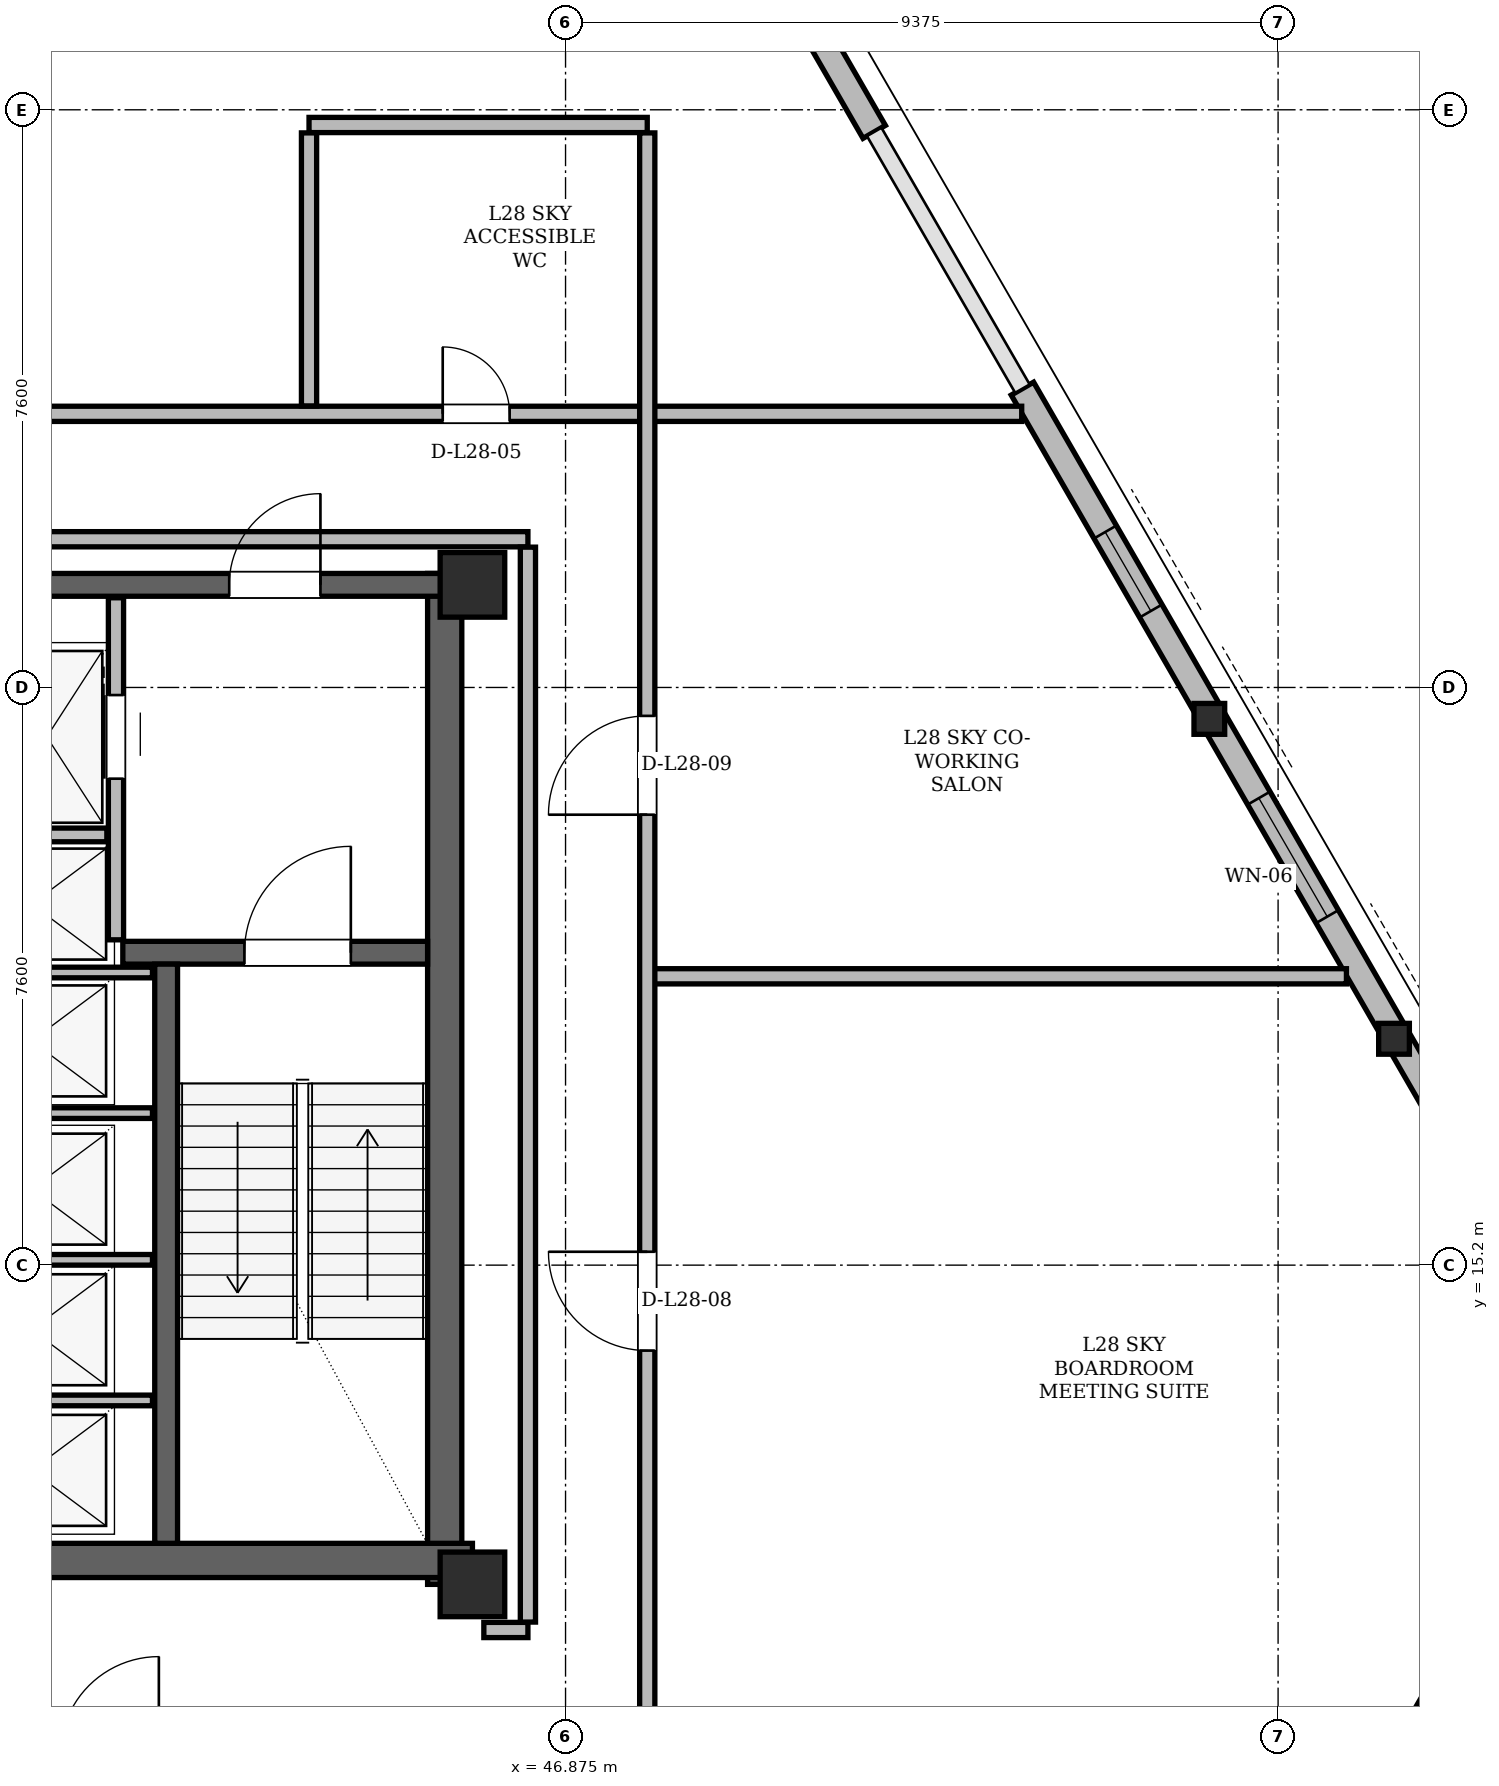
"""IFC4 building model, lengths in metres.
Left out: names, types, materials, properties, quantities, classifications, styles, units other than length and angle.
Written with IfcOpenShell. Run it as: python <this file> out.ifc"""

import sys

from ifc_helpers import new_model, si_unit, direction, frame, frame_2d, origin, origin_2d, place, context, subcontext, project, spatial, rectangle, hollow_rectangle, i_section, extrude, element, fill, save


model = new_model("IFC4")
c1 = context("Model", 3, precision=1e-05, world=origin(), true_north=direction((0.0, 1.0)))
c2 = subcontext(c1, "Body", "Model", "MODEL_VIEW")
j1 = project(units=[si_unit("LENGTHUNIT", "METRE"), si_unit("PLANEANGLEUNIT", "RADIAN")], contexts=[c1])
p1 = place(None, origin())
s1 = spatial("IfcSite", under=j1, at=p1, CompositionType="ELEMENT")
p2 = place(p1, origin())
s2 = spatial("IfcBuilding", under=s1, at=p2, CompositionType="ELEMENT")
p3 = place(p2, frame((0.0, 0.0, 107.7)))
s3 = spatial("IfcBuildingStorey", under=s2, at=p3, CompositionType="ELEMENT", Elevation=107.7)
for number, where, z_axis, x_axis in (
    (1, (45.65, 11.0, 0.0), (0.0, 0.0, 1.0), (1.0, 0.0, 0.0)),
    (2, (45.65, 24.15, 0.0), (0.0, 0.0, 1.0), (1.0, 0.0, 0.0)),
):
    element("IfcColumn", number, at=place(p3, frame(where, z_axis=z_axis, x_axis=x_axis)), inside=s3, PredefinedType="COLUMN", context=c2, shape_type="SweptSolid", body=[
        extrude(hollow_rectangle(XDim=0.85, YDim=0.85, WallThickness=0.07, at=origin_2d()), origin(), (0.0, 0.0, 1.0), 4.5),
    ])
p4 = place(p3, frame((57.806, 18.211, 0.005), z_axis=(-0.013533621776, -0.014511955881, 0.999803102725), x_axis=(0.731328464802, -0.682025422231, 0.0)))
e3 = element("IfcColumn", 3, at=p4, inside=s3, PredefinedType="COLUMN", context=c2, shape_type="SweptSolid", body=[
    extrude(i_section(OverallWidth=0.404, OverallDepth=0.406, WebThickness=0.027, FlangeThickness=0.044, at=origin_2d()), origin(), (0.0, 0.0, 1.0), 4.492),
])
p5 = place(p3, frame((55.378, 22.415, 0.005), z_axis=(-0.014729514646, -0.012501064091, 0.999813364981), x_axis=(0.647076579323, -0.762425013029, 0.0)))
e4 = element("IfcColumn", 4, at=p5, inside=s3, PredefinedType="COLUMN", context=c2, shape_type="SweptSolid", body=[
    extrude(i_section(OverallWidth=0.404, OverallDepth=0.406, WebThickness=0.027, FlangeThickness=0.044, at=origin_2d()), origin(), (0.0, 0.0, 1.0), 4.492),
])
p6 = place(p3, frame((45.285, 11.0, 0.0), z_axis=(0.0, 0.0, 1.0), x_axis=(0.0, 1.0, 0.0)))
e5 = element("IfcWall", 5, at=p6, inside=s3, PredefinedType="SHEAR", context=c2, shape_type="SweptSolid", body=[
    extrude(rectangle(XDim=13.3, YDim=0.45, at=frame_2d((6.65, 0.0))), origin(), (0.0, 0.0, 1.0), 4.26),
])
p7 = place(p3, frame((38.55, 11.315, 0.0), z_axis=(0.0, 0.0, 1.0), x_axis=(1.0, 0.0, 0.0)))
e6 = element("IfcWall", 6, at=p7, inside=s3, PredefinedType="SHEAR", context=c2, shape_type="SweptSolid", body=[
    extrude(rectangle(XDim=7.1, YDim=0.45, at=frame_2d((3.55, 0.0))), origin(), (0.0, 0.0, 1.0), 4.26),
])
p8 = place(p3, frame((29.65, 24.15, 0.0), z_axis=(0.0, 0.0, 1.0), x_axis=(1.0, 0.0, 0.0)))
e7 = element("IfcWall", 7, at=p8, inside=s3, PredefinedType="SHEAR", context=c2, shape_type="SweptSolid", body=[
    extrude(rectangle(XDim=15.7, YDim=0.3, at=frame_2d((7.85, 0.0))), origin(), (0.0, 0.0, 1.0), 4.26),
])
p9 = place(p8, frame((1.7, 0.0, 0.0)))
e8 = element("IfcOpeningElement", 8, at=p9, cuts=e7, PredefinedType="OPENING", context=c2, shape_type="SweptSolid", body=[
    extrude(rectangle(XDim=1.2, YDim=2.2, at=frame_2d((0.6, 1.1))), frame((0.0, 0.15, 0.0), z_axis=(0.0, -1.0, 0.0), x_axis=(1.0, 0.0, 0.0)), (0.0, 0.0, 1.0), 0.3),
])
p10 = place(p8, frame((12.8, 0.0, 0.0)))
e9 = element("IfcOpeningElement", 9, at=p10, cuts=e7, PredefinedType="OPENING", context=c2, shape_type="SweptSolid", body=[
    extrude(rectangle(XDim=1.2, YDim=2.2, at=frame_2d((0.6, 1.1))), frame((0.0, 0.15, 0.0), z_axis=(0.0, -1.0, 0.0), x_axis=(1.0, 0.0, 0.0)), (0.0, 0.0, 1.0), 0.3),
])
p11 = place(p8, frame((6.55, 0.0, 0.0)))
e10 = element("IfcOpeningElement", 10, at=p11, cuts=e7, PredefinedType="OPENING", context=c2, shape_type="SweptSolid", body=[
    extrude(rectangle(XDim=0.9, YDim=2.05, at=frame_2d((0.45, 1.025))), frame((0.0, 0.15, 0.0), z_axis=(0.0, -1.0, 0.0), x_axis=(1.0, 0.0, 0.0)), (0.0, 0.0, 1.0), 0.3),
])
p12 = place(p8, frame((8.45, 0.0, 0.0)))
e11 = element("IfcOpeningElement", 11, at=p12, cuts=e7, PredefinedType="OPENING", context=c2, shape_type="SweptSolid", body=[
    extrude(rectangle(XDim=0.9, YDim=2.05, at=frame_2d((0.45, 1.025))), frame((0.0, 0.15, 0.0), z_axis=(0.0, -1.0, 0.0), x_axis=(1.0, 0.0, 0.0)), (0.0, 0.0, 1.0), 0.3),
])
p13 = place(p3, frame((41.05, 19.31, 0.0), z_axis=(0.0, 0.0, 1.0), x_axis=(1.0, 0.0, 0.0)))
e12 = element("IfcWall", 12, at=p13, inside=s3, PredefinedType="SHEAR", context=c2, shape_type="SweptSolid", body=[
    extrude(rectangle(XDim=4.01, YDim=0.3, at=frame_2d((2.005, 0.0))), origin(), (0.0, 0.0, 1.0), 4.26),
])
p14 = place(p13, frame((1.6, 0.0, 0.0)))
e13 = element("IfcOpeningElement", 13, at=p14, cuts=e12, PredefinedType="OPENING", context=c2, shape_type="SweptSolid", body=[
    extrude(rectangle(XDim=1.4, YDim=2.2, at=frame_2d((0.7, 1.1))), frame((0.0, 0.15, 0.0), z_axis=(0.0, -1.0, 0.0), x_axis=(1.0, 0.0, 0.0)), (0.0, 0.0, 1.0), 0.3),
])
p15 = place(p3, frame((41.62, 11.54, 0.0), z_axis=(0.0, 0.0, 1.0), x_axis=(0.0, 1.0, 0.0)))
e14 = element("IfcWall", 14, at=p15, inside=s3, PredefinedType="SHEAR", context=c2, shape_type="SweptSolid", body=[
    extrude(rectangle(XDim=7.62, YDim=0.3, at=frame_2d((3.81, 0.0))), origin(), (0.0, 0.0, 1.0), 4.26),
])
p16 = place(p3, frame((54.837, 3.459, 0.0), z_axis=(0.0, 0.0, 1.0), x_axis=(0.500009490851, 0.86601992417, 0.0)))
e15 = element("IfcWall", 15, at=p16, inside=s3, PredefinedType="SOLIDWALL", context=c2, shape_type="SweptSolid", body=[
    extrude(rectangle(XDim=11.486, YDim=0.34, at=frame_2d((5.743, 0.0))), origin(), (0.0, 0.0, 1.0), 3.478),
])
p17 = place(p3, frame((60.58, 13.406, 0.0), z_axis=(0.0, 0.0, 1.0), x_axis=(-0.499995774941, 0.86602784311, 0.0)))
e16 = element("IfcWall", 16, at=p17, inside=s3, PredefinedType="SOLIDWALL", context=c2, shape_type="SweptSolid", body=[
    extrude(rectangle(XDim=15.387, YDim=0.34, at=frame_2d((7.693, 0.0))), origin(), (0.0, 0.0, 1.0), 3.478),
])
p18 = place(p17, frame((1.263, 0.0, 0.85)))
e17 = element("IfcOpeningElement", 17, at=p18, cuts=e16, PredefinedType="OPENING", context=c2, shape_type="SweptSolid", body=[
    extrude(rectangle(XDim=2.0, YDim=1.8, at=frame_2d((1.0, 0.9))), frame((0.0, 0.17, 0.0), z_axis=(0.0, -1.0, 0.0), x_axis=(1.0, 0.0, 0.0)), (0.0, 0.0, 1.0), 0.34),
])
p19 = place(p17, frame((7.365, 0.0, 0.85)))
e18 = element("IfcOpeningElement", 18, at=p19, cuts=e16, PredefinedType="OPENING", context=c2, shape_type="SweptSolid", body=[
    extrude(rectangle(XDim=1.8, YDim=1.75, at=frame_2d((0.9, 0.875))), frame((0.0, 0.17, 0.0), z_axis=(0.0, -1.0, 0.0), x_axis=(1.0, 0.0, 0.0)), (0.0, 0.0, 1.0), 0.34),
])
p20 = place(p17, frame((12.008, 0.0, 0.85)))
e19 = element("IfcOpeningElement", 19, at=p20, cuts=e16, PredefinedType="OPENING", context=c2, shape_type="SweptSolid", body=[
    extrude(rectangle(XDim=1.2, YDim=1.48, at=frame_2d((0.6, 0.74))), frame((0.0, 0.17, 0.0), z_axis=(0.0, -1.0, 0.0), x_axis=(1.0, 0.0, 0.0)), (0.0, 0.0, 1.0), 0.34),
])
p21 = place(p3, frame((50.936, 30.109, 0.0), z_axis=(0.0, 0.0, 1.0), x_axis=(-0.500002645523, 0.866023876385, 0.0)))
e20 = element("IfcWall", 20, at=p21, inside=s3, PredefinedType="SOLIDWALL", context=c2, shape_type="SweptSolid", body=[
    extrude(rectangle(XDim=15.387, YDim=0.34, at=frame_2d((7.693, 0.0))), origin(), (0.0, 0.0, 1.0), 3.478),
])
p22 = place(p21, frame((1.911, 0.0, 0.85)))
e21 = element("IfcOpeningElement", 21, at=p22, cuts=e20, PredefinedType="OPENING", context=c2, shape_type="SweptSolid", body=[
    extrude(rectangle(XDim=1.2, YDim=1.48, at=frame_2d((0.6, 0.74))), frame((0.0, 0.17, 0.0), z_axis=(0.0, -1.0, 0.0), x_axis=(1.0, 0.0, 0.0)), (0.0, 0.0, 1.0), 0.34),
])
p23 = place(p21, frame((11.076, 0.0, 0.85)))
e22 = element("IfcOpeningElement", 22, at=p23, cuts=e20, PredefinedType="OPENING", context=c2, shape_type="SweptSolid", body=[
    extrude(rectangle(XDim=2.8, YDim=2.05, at=frame_2d((1.4, 1.025))), frame((0.0, 0.17, 0.0), z_axis=(0.0, -1.0, 0.0), x_axis=(1.0, 0.0, 0.0)), (0.0, 0.0, 1.0), 0.34),
])
p24 = place(p3, frame((40.96, 19.48, 0.0), z_axis=(0.0, 0.0, 1.0), x_axis=(0.0, 1.0, 0.0)))
e23 = element("IfcWall", 23, at=p24, inside=s3, PredefinedType="PARTITIONING", context=c2, shape_type="SweptSolid", body=[
    extrude(rectangle(XDim=4.5, YDim=0.2, at=frame_2d((2.25, 0.0))), origin(), (0.0, 0.0, 1.0), 3.3),
])
p25 = place(p24, frame((2.12, 0.0, 0.0)))
e24 = element("IfcOpeningElement", 24, at=p25, cuts=e23, PredefinedType="OPENING", context=c2, shape_type="SweptSolid", body=[
    extrude(rectangle(XDim=1.1, YDim=2.2, at=frame_2d((0.55, 1.1))), frame((0.0, 0.1, 0.0), z_axis=(0.0, -1.0, 0.0), x_axis=(1.0, 0.0, 0.0)), (0.0, 0.0, 1.0), 0.2),
])
p26 = place(p3, frame((39.26, 20.86, 0.0), z_axis=(0.0, 0.0, 1.0), x_axis=(1.0, 0.0, 0.0)))
e25 = element("IfcWall", 25, at=p26, inside=s3, PredefinedType="PARTITIONING", context=c2, shape_type="SweptSolid", body=[
    extrude(rectangle(XDim=1.58, YDim=0.18, at=frame_2d((0.79, 0.0))), origin(), (0.0, 0.0, 1.0), 4.26),
])
for number, where, z_axis, x_axis in (
    (26, (38.78, 13.42, 0.0), (0.0, 0.0, 1.0), (1.0, 0.0, 0.0)),
    (27, (38.78, 15.27, 0.0), (0.0, 0.0, 1.0), (1.0, 0.0, 0.0)),
    (28, (38.78, 17.2, 0.0), (0.0, 0.0, 1.0), (1.0, 0.0, 0.0)),
    (29, (38.78, 19.05, 0.0), (0.0, 0.0, 1.0), (1.0, 0.0, 0.0)),
):
    element("IfcWall", number, at=place(p3, frame(where, z_axis=z_axis, x_axis=x_axis)), inside=s3, PredefinedType="PARTITIONING", context=c2, shape_type="SweptSolid", body=[
        extrude(rectangle(XDim=2.66, YDim=0.14, at=frame_2d((1.33, 0.0))), origin(), (0.0, 0.0, 1.0), 4.26),
    ])
p27 = place(p3, frame((45.8, 10.4, 0.0), z_axis=(0.0, 0.0, 1.0), x_axis=(1.0, 0.0, 0.0)))
e30 = element("IfcWall", 30, at=p27, inside=s3, PredefinedType="PARTITIONING", context=c2, shape_type="SweptSolid", body=[
    extrude(rectangle(XDim=0.58, YDim=0.2, at=frame_2d((0.29, 0.0))), origin(), (0.0, 0.0, 1.0), 3.714),
])
p28 = place(p3, frame((47.95, 19.0, 0.0), z_axis=(0.0, 0.0, 1.0), x_axis=(1.0, 0.0, 0.0)))
e31 = element("IfcWall", 31, at=p28, inside=s3, PredefinedType="PARTITIONING", context=c2, shape_type="SweptSolid", body=[
    extrude(rectangle(XDim=9.199, YDim=0.2, at=frame_2d((4.6, 0.0))), origin(), (0.0, 0.0, 1.0), 4.26),
])
p29 = place(p3, frame((28.62, 24.75, 0.0), z_axis=(0.0, 0.0, 1.0), x_axis=(1.0, 0.0, 0.0)))
e32 = element("IfcWall", 32, at=p29, inside=s3, PredefinedType="PARTITIONING", context=c2, shape_type="SweptSolid", body=[
    extrude(rectangle(XDim=17.76, YDim=0.2, at=frame_2d((8.88, 0.0))), origin(), (0.0, 0.0, 1.0), 3.714),
])
p30 = place(p3, frame((22.123, 26.4, 0.0), z_axis=(0.0, 0.0, 1.0), x_axis=(1.0, 0.0, 0.0)))
e33 = element("IfcWall", 33, at=p30, inside=s3, PredefinedType="PARTITIONING", context=c2, shape_type="SweptSolid", body=[
    extrude(rectangle(XDim=30.753, YDim=0.2, at=frame_2d((15.377, 0.0))), origin(), (0.0, 0.0, 1.0), 3.714),
])
p31 = place(p30, frame((7.015, 0.0, 0.0)))
e34 = element("IfcOpeningElement", 34, at=p31, cuts=e33, PredefinedType="OPENING", context=c2, shape_type="SweptSolid", body=[
    extrude(rectangle(XDim=0.88, YDim=2.08, at=frame_2d((0.44, 1.04))), frame((0.0, 0.1, 0.0), z_axis=(0.0, -1.0, 0.0), x_axis=(1.0, 0.0, 0.0)), (0.0, 0.0, 1.0), 0.2),
])
p32 = place(p30, frame((15.226, 0.0, 0.0)))
e35 = element("IfcOpeningElement", 35, at=p32, cuts=e33, PredefinedType="OPENING", context=c2, shape_type="SweptSolid", body=[
    extrude(rectangle(XDim=1.3, YDim=2.2, at=frame_2d((0.65, 1.1))), frame((0.0, 0.1, 0.0), z_axis=(0.0, -1.0, 0.0), x_axis=(1.0, 0.0, 0.0)), (0.0, 0.0, 1.0), 0.2),
])
p33 = place(p30, frame((23.136, 0.0, 0.0)))
e36 = element("IfcOpeningElement", 36, at=p33, cuts=e33, PredefinedType="OPENING", context=c2, shape_type="SweptSolid", body=[
    extrude(rectangle(XDim=0.88, YDim=2.08, at=frame_2d((0.44, 1.04))), frame((0.0, 0.1, 0.0), z_axis=(0.0, -1.0, 0.0), x_axis=(1.0, 0.0, 0.0)), (0.0, 0.0, 1.0), 0.2),
])
p34 = place(p3, frame((43.5, 30.2, 0.0), z_axis=(0.0, 0.0, 1.0), x_axis=(1.0, 0.0, 0.0)))
e37 = element("IfcWall", 37, at=p34, inside=s3, PredefinedType="PARTITIONING", context=c2, shape_type="SweptSolid", body=[
    extrude(rectangle(XDim=4.45, YDim=0.2, at=frame_2d((2.225, 0.0))), origin(), (0.0, 0.0, 1.0), 3.714),
])
p35 = place(p3, frame((43.5, 26.504, 0.0), z_axis=(0.0, 0.0, 1.0), x_axis=(0.0, 1.0, 0.0)))
e38 = element("IfcWall", 38, at=p35, inside=s3, PredefinedType="PARTITIONING", context=c2, shape_type="SweptSolid", body=[
    extrude(rectangle(XDim=3.592, YDim=0.2, at=frame_2d((1.796, 0.0))), origin(), (0.0, 0.0, 1.0), 4.26),
])
p36 = place(p3, frame((46.38, 10.504, 0.0), z_axis=(0.0, 0.0, 1.0), x_axis=(0.0, 1.0, 0.0)))
e39 = element("IfcWall", 39, at=p36, inside=s3, PredefinedType="PARTITIONING", context=c2, shape_type="SweptSolid", body=[
    extrude(rectangle(XDim=14.142, YDim=0.2, at=frame_2d((7.071, 0.0))), origin(), (0.0, 0.0, 1.0), 3.714),
])
p37 = place(p3, frame((47.95, 8.854, 0.0), z_axis=(0.0, 0.0, 1.0), x_axis=(0.0, 1.0, 0.0)))
e40 = element("IfcWall", 40, at=p37, inside=s3, PredefinedType="PARTITIONING", context=c2, shape_type="SweptSolid", body=[
    extrude(rectangle(XDim=21.242, YDim=0.2, at=frame_2d((10.621, 0.0))), origin(), (0.0, 0.0, 1.0), 3.714),
])
p38 = place(p37, frame((5.222, 0.0, 0.0)))
e41 = element("IfcOpeningElement", 41, at=p38, cuts=e40, PredefinedType="OPENING", context=c2, shape_type="SweptSolid", body=[
    extrude(rectangle(XDim=1.3, YDim=2.2, at=frame_2d((0.65, 1.1))), frame((0.0, 0.1, 0.0), z_axis=(0.0, -1.0, 0.0), x_axis=(1.0, 0.0, 0.0)), (0.0, 0.0, 1.0), 0.2),
])
p39 = place(p37, frame((12.272, 0.0, 0.0)))
e42 = element("IfcOpeningElement", 42, at=p39, cuts=e40, PredefinedType="OPENING", context=c2, shape_type="SweptSolid", body=[
    extrude(rectangle(XDim=1.3, YDim=2.2, at=frame_2d((0.65, 1.1))), frame((0.0, 0.1, 0.0), z_axis=(0.0, -1.0, 0.0), x_axis=(1.0, 0.0, 0.0)), (0.0, 0.0, 1.0), 0.2),
])
p40 = place(p19, origin())
e43 = element("IfcWindow", 43, at=p40, inside=s3, PartitioningType="SINGLE_PANEL", PredefinedType="WINDOW", context=c2, shape_type="SweptSolid", body=[
    extrude(rectangle(XDim=1.8, YDim=1.75, at=frame_2d((0.9, 0.875))), frame((0.0, 0.03, 0.0), z_axis=(0.0, -1.0, 0.0), x_axis=(1.0, 0.0, 0.0)), (0.0, 0.0, 1.0), 0.06),
])
fill(e18, e43)
p41 = place(p20, origin())
e44 = element("IfcWindow", 44, at=p41, inside=s3, PartitioningType="SINGLE_PANEL", PredefinedType="WINDOW", context=c2, shape_type="SweptSolid", body=[
    extrude(rectangle(XDim=1.2, YDim=1.48, at=frame_2d((0.6, 0.74))), frame((0.0, 0.03, 0.0), z_axis=(0.0, -1.0, 0.0), x_axis=(1.0, 0.0, 0.0)), (0.0, 0.0, 1.0), 0.06),
])
fill(e19, e44)
p42 = place(p25, origin())
e45 = element("IfcDoor", 45, at=p42, inside=s3, OperationType="SLIDING_TO_RIGHT", PredefinedType="DOOR", context=c2, shape_type="SweptSolid", body=[
    extrude(rectangle(XDim=1.1, YDim=2.2, at=frame_2d((0.55, 1.1))), frame((0.0, 0.025, 0.0), z_axis=(0.0, -1.0, 0.0), x_axis=(1.0, 0.0, 0.0)), (0.0, 0.0, 1.0), 0.05),
])
fill(e24, e45)
p43 = place(p14, origin())
e46 = element("IfcDoor", 46, at=p43, inside=s3, OperationType="SINGLE_SWING_RIGHT", PredefinedType="DOOR", context=c2, shape_type="SweptSolid", body=[
    extrude(rectangle(XDim=1.4, YDim=2.2, at=frame_2d((0.7, 1.1))), frame((0.0, 0.025, 0.0), z_axis=(0.0, -1.0, 0.0), x_axis=(1.0, 0.0, 0.0)), (0.0, 0.0, 1.0), 0.05),
])
fill(e13, e46)
p44 = place(p10, origin())
e47 = element("IfcDoor", 47, at=p44, inside=s3, OperationType="SINGLE_SWING_RIGHT", PredefinedType="DOOR", context=c2, shape_type="SweptSolid", body=[
    extrude(rectangle(XDim=1.2, YDim=2.2, at=frame_2d((0.6, 1.1))), frame((0.0, 0.025, 0.0), z_axis=(0.0, -1.0, 0.0), x_axis=(1.0, 0.0, 0.0)), (0.0, 0.0, 1.0), 0.05),
])
fill(e9, e47)
p45 = place(p33, origin())
e48 = element("IfcDoor", 48, at=p45, inside=s3, OperationType="SINGLE_SWING_LEFT", PredefinedType="DOOR", context=c2, shape_type="SweptSolid", body=[
    extrude(rectangle(XDim=0.88, YDim=2.08, at=frame_2d((0.44, 1.04))), frame((0.0, 0.025, 0.0), z_axis=(0.0, -1.0, 0.0), x_axis=(1.0, 0.0, 0.0)), (0.0, 0.0, 1.0), 0.05),
])
fill(e36, e48)
p46 = place(p38, origin())
e49 = element("IfcDoor", 49, at=p46, inside=s3, OperationType="SINGLE_SWING_RIGHT", PredefinedType="DOOR", context=c2, shape_type="SweptSolid", body=[
    extrude(rectangle(XDim=1.3, YDim=2.2, at=frame_2d((0.65, 1.1))), frame((0.0, 0.025, 0.0), z_axis=(0.0, -1.0, 0.0), x_axis=(1.0, 0.0, 0.0)), (0.0, 0.0, 1.0), 0.05),
])
fill(e41, e49)
p47 = place(p39, origin())
e50 = element("IfcDoor", 50, at=p47, inside=s3, OperationType="SINGLE_SWING_LEFT", PredefinedType="DOOR", context=c2, shape_type="SweptSolid", body=[
    extrude(rectangle(XDim=1.3, YDim=2.2, at=frame_2d((0.65, 1.1))), frame((0.0, 0.025, 0.0), z_axis=(0.0, -1.0, 0.0), x_axis=(1.0, 0.0, 0.0)), (0.0, 0.0, 1.0), 0.05),
])
fill(e42, e50)
save(model, sys.argv[1])
